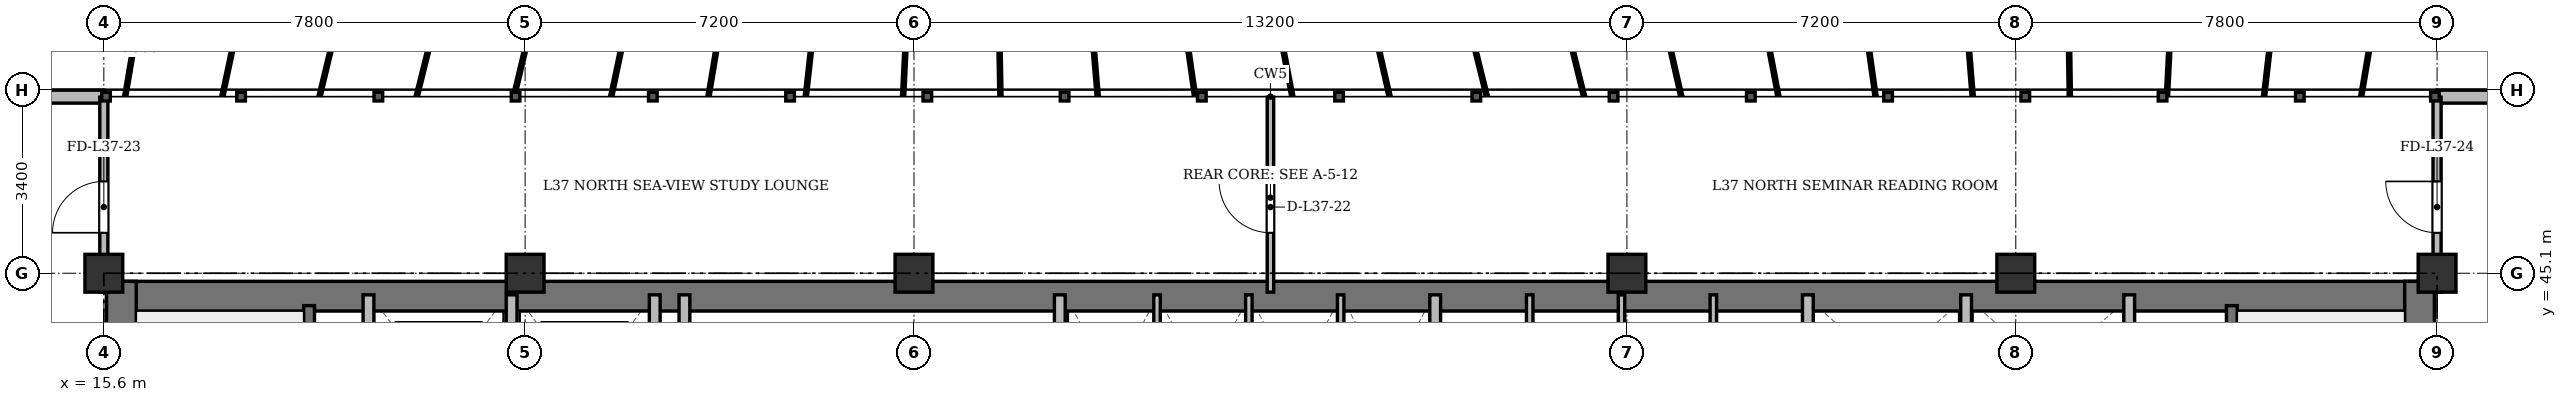
"""IFC4 building model, lengths in metres.
Left out: names, types, materials, properties, quantities, classifications, styles, units other than length and angle.
Written with IfcOpenShell. Run it as: python <this file> out.ifc"""

import sys

from ifc_helpers import new_model, si_unit, direction, frame, frame_2d, origin, origin_2d, place, context, subcontext, project, spatial, rectangle, extrude, source, transform, mapped, element, fill, save


model = new_model("IFC4")
c1 = context("Model", 3, precision=1e-05, world=origin(), true_north=direction((0.0, 1.0)))
c2 = subcontext(c1, "Body", "Model", "MODEL_VIEW")
j1 = project(units=[si_unit("LENGTHUNIT", "METRE"), si_unit("PLANEANGLEUNIT", "RADIAN")], contexts=[c1])
p1 = place(None, origin())
s1 = spatial("IfcSite", under=j1, at=p1, CompositionType="ELEMENT")
p2 = place(p1, origin())
s2 = spatial("IfcBuilding", under=s1, at=p2, CompositionType="ELEMENT")
p3 = place(p2, frame((0.0, 0.0, 142.9)))
s3 = spatial("IfcBuildingStorey", under=s2, at=p3, CompositionType="ELEMENT", Elevation=142.9)
m1 = source(origin(), c2, "Body", "SweptSolid", [
    extrude(rectangle(XDim=0.7, YDim=0.7, at=origin_2d()), origin(), (0.0, 0.0, 1.0), 3.6),
])
for number, where, z_axis, x_axis in (
    (1, (15.6, 45.1, 0.0), (0.0, 0.0, 1.0), (1.0, 0.0, 0.0)),
    (2, (23.4, 45.1, 0.0), (0.0, 0.0, 1.0), (1.0, 0.0, 0.0)),
    (3, (30.6, 45.1, 0.0), (0.0, 0.0, 1.0), (1.0, 0.0, 0.0)),
    (4, (43.8, 45.1, 0.0), (0.0, 0.0, 1.0), (1.0, 0.0, 0.0)),
    (5, (51.0, 45.1, 0.0), (0.0, 0.0, 1.0), (1.0, 0.0, 0.0)),
    (6, (58.8, 45.1, 0.0), (0.0, 0.0, 1.0), (1.0, 0.0, 0.0)),
):
    element("IfcColumn", number, at=place(p3, frame(where, z_axis=z_axis, x_axis=x_axis)), inside=s3, PredefinedType="COLUMN", context=c2, shape_type="MappedRepresentation", body=[
        mapped(m1, transform((0.0, 0.0, 0.0), x_axis=(1.0, 0.0, 0.0), y_axis=(0.0, 1.0, 0.0), z_axis=(0.0, 0.0, 1.0), scale=1.0)),
    ])
p4 = place(p3, frame((10.9, 48.37, 0.0), z_axis=(0.0, 0.0, 1.0), x_axis=(1.0, 0.0, 0.0)))
e7 = element("IfcWall", 7, at=p4, inside=s3, PredefinedType="SOLIDWALL", context=c2, shape_type="SweptSolid", body=[
    extrude(rectangle(XDim=4.7, YDim=0.24, at=frame_2d((2.35, 0.0))), origin(), (0.0, 0.0, 1.0), 3.35),
])
p5 = place(p4, frame((1.675, 0.0, 0.9)))
e8 = element("IfcOpeningElement", 8, at=p5, cuts=e7, PredefinedType="OPENING", context=c2, shape_type="SweptSolid", body=[
    extrude(rectangle(XDim=1.35, YDim=1.5, at=frame_2d((0.675, 0.75))), frame((0.0, 0.13, 0.0), z_axis=(0.0, -1.0, 0.0), x_axis=(1.0, 0.0, 0.0)), (0.0, 0.0, 1.0), 0.26),
])
p6 = place(p3, frame((58.8, 48.37, 0.0), z_axis=(0.0, 0.0, 1.0), x_axis=(1.0, 0.0, 0.0)))
e9 = element("IfcWall", 9, at=p6, inside=s3, PredefinedType="SOLIDWALL", context=c2, shape_type="SweptSolid", body=[
    extrude(rectangle(XDim=4.7, YDim=0.24, at=frame_2d((2.35, 0.0))), origin(), (0.0, 0.0, 1.0), 3.35),
])
p7 = place(p6, frame((1.675, 0.0, 0.9)))
e10 = element("IfcOpeningElement", 10, at=p7, cuts=e9, PredefinedType="OPENING", context=c2, shape_type="SweptSolid", body=[
    extrude(rectangle(XDim=1.35, YDim=1.5, at=frame_2d((0.675, 0.75))), frame((0.0, 0.13, 0.0), z_axis=(0.0, -1.0, 0.0), x_axis=(1.0, 0.0, 0.0)), (0.0, 0.0, 1.0), 0.26),
])
p8 = place(p3, frame((15.65, 44.675, 0.0), z_axis=(0.0, 0.0, 1.0), x_axis=(1.0, 0.0, 0.0)))
e11 = element("IfcWall", 11, at=p8, inside=s3, PredefinedType="SHEAR", context=c2, shape_type="SweptSolid", body=[
    extrude(rectangle(XDim=43.1, YDim=0.55, at=frame_2d((21.55, 0.0))), origin(), (0.0, 0.0, 1.0), 3.35),
])
for number, where, z_axis, x_axis in (
    (12, (15.925, 33.4, 0.0), (0.0, 0.0, 1.0), (0.0, 1.0, 0.0)),
    (13, (58.475, 33.4, 0.0), (0.0, 0.0, 1.0), (0.0, 1.0, 0.0)),
):
    element("IfcWall", number, at=place(p3, frame(where, z_axis=z_axis, x_axis=x_axis)), inside=s3, PredefinedType="SHEAR", context=c2, shape_type="SweptSolid", body=[
        extrude(rectangle(XDim=11.55, YDim=0.55, at=frame_2d((5.775, 0.0))), origin(), (0.0, 0.0, 1.0), 3.35),
    ])
p9 = place(p3, frame((19.4, 33.4, 0.0), z_axis=(0.0, 0.0, 1.0), x_axis=(0.0, 1.0, 0.0)))
e14 = element("IfcWall", 14, at=p9, inside=s3, PredefinedType="SHEAR", context=c2, shape_type="SweptSolid", body=[
    extrude(rectangle(XDim=11.1, YDim=0.2, at=frame_2d((5.55, 0.0))), origin(), (0.0, 0.0, 1.0), 3.35),
])
p10 = place(p9, frame((0.85, 0.0, 0.0)))
e15 = element("IfcOpeningElement", 15, at=p10, cuts=e14, PredefinedType="OPENING", context=c2, shape_type="SweptSolid", body=[
    extrude(rectangle(XDim=1.1, YDim=2.15, at=frame_2d((0.55, 1.075))), frame((0.0, 0.11, 0.0), z_axis=(0.0, -1.0, 0.0), x_axis=(1.0, 0.0, 0.0)), (0.0, 0.0, 1.0), 0.22),
])
p11 = place(p3, frame((55.0, 33.4, 0.0), z_axis=(0.0, 0.0, 1.0), x_axis=(0.0, 1.0, 0.0)))
e16 = element("IfcWall", 16, at=p11, inside=s3, PredefinedType="SHEAR", context=c2, shape_type="SweptSolid", body=[
    extrude(rectangle(XDim=11.1, YDim=0.2, at=frame_2d((5.55, 0.0))), origin(), (0.0, 0.0, 1.0), 3.35),
])
p12 = place(p11, frame((0.85, 0.0, 0.0)))
e17 = element("IfcOpeningElement", 17, at=p12, cuts=e16, PredefinedType="OPENING", context=c2, shape_type="SweptSolid", body=[
    extrude(rectangle(XDim=1.1, YDim=2.15, at=frame_2d((0.55, 1.075))), frame((0.0, 0.11, 0.0), z_axis=(0.0, -1.0, 0.0), x_axis=(1.0, 0.0, 0.0)), (0.0, 0.0, 1.0), 0.22),
])
for number, where, z_axis, x_axis in (
    (18, (20.5, 41.3, 0.0), (0.0, 0.0, 1.0), (0.0, 1.0, 0.0)),
    (19, (23.15, 41.3, 0.0), (0.0, 0.0, 1.0), (0.0, 1.0, 0.0)),
    (20, (25.8, 41.3, 0.0), (0.0, 0.0, 1.0), (0.0, 1.0, 0.0)),
):
    element("IfcWall", number, at=place(p3, frame(where, z_axis=z_axis, x_axis=x_axis)), inside=s3, PredefinedType="SOLIDWALL", context=c2, shape_type="SweptSolid", body=[
        extrude(rectangle(XDim=3.4, YDim=0.2, at=frame_2d((1.7, 0.0))), origin(), (0.0, 0.0, 1.0), 3.35),
    ])
for number, where, z_axis, x_axis in (
    (21, (26.35, 33.4, 0.0), (0.0, 0.0, 1.0), (0.0, 1.0, 0.0)),
    (22, (33.3, 33.4, 0.0), (0.0, 0.0, 1.0), (0.0, 1.0, 0.0)),
):
    element("IfcWall", number, at=place(p3, frame(where, z_axis=z_axis, x_axis=x_axis)), inside=s3, PredefinedType="SOLIDWALL", context=c2, shape_type="SweptSolid", body=[
        extrude(rectangle(XDim=11.3, YDim=0.2, at=frame_2d((5.65, 0.0))), origin(), (0.0, 0.0, 1.0), 2.75),
    ])
for number, where, z_axis, x_axis in (
    (23, (35.1, 41.5, 0.0), (0.0, 0.0, 1.0), (0.0, 1.0, 0.0)),
    (24, (36.8, 41.5, 0.0), (0.0, 0.0, 1.0), (0.0, 1.0, 0.0)),
    (25, (38.5, 41.5, 0.0), (0.0, 0.0, 1.0), (0.0, 1.0, 0.0)),
):
    element("IfcWall", number, at=place(p3, frame(where, z_axis=z_axis, x_axis=x_axis)), inside=s3, PredefinedType="PARTITIONING", context=c2, shape_type="SweptSolid", body=[
        extrude(rectangle(XDim=3.2, YDim=0.12, at=frame_2d((1.6, 0.0))), origin(), (0.0, 0.0, 1.0), 3.35),
    ])
p13 = place(p3, frame((40.25, 41.5, 0.0), z_axis=(0.0, 0.0, 1.0), x_axis=(0.0, 1.0, 0.0)))
e26 = element("IfcWall", 26, at=p13, inside=s3, PredefinedType="SOLIDWALL", context=c2, shape_type="SweptSolid", body=[
    extrude(rectangle(XDim=3.2, YDim=0.2, at=frame_2d((1.6, 0.0))), origin(), (0.0, 0.0, 1.0), 3.35),
])
p14 = place(p3, frame((42.0, 41.5, 0.0), z_axis=(0.0, 0.0, 1.0), x_axis=(0.0, 1.0, 0.0)))
e27 = element("IfcWall", 27, at=p14, inside=s3, PredefinedType="PARTITIONING", context=c2, shape_type="SweptSolid", body=[
    extrude(rectangle(XDim=3.2, YDim=0.12, at=frame_2d((1.6, 0.0))), origin(), (0.0, 0.0, 1.0), 3.35),
])
p15 = place(p3, frame((43.7, 41.5, 0.0), z_axis=(0.0, 0.0, 1.0), x_axis=(0.0, 1.0, 0.0)))
e28 = element("IfcWall", 28, at=p15, inside=s3, PredefinedType="PARTITIONING", context=c2, shape_type="SweptSolid", body=[
    extrude(rectangle(XDim=3.2, YDim=0.12, at=frame_2d((1.6, 0.0))), origin(), (0.0, 0.0, 1.0), 2.85),
])
p16 = place(p3, frame((45.4, 41.5, 0.0), z_axis=(0.0, 0.0, 1.0), x_axis=(0.0, 1.0, 0.0)))
e29 = element("IfcWall", 29, at=p16, inside=s3, PredefinedType="PARTITIONING", context=c2, shape_type="SweptSolid", body=[
    extrude(rectangle(XDim=3.2, YDim=0.12, at=frame_2d((1.6, 0.0))), origin(), (0.0, 0.0, 1.0), 3.35),
])
p17 = place(p3, frame((47.15, 33.4, 0.0), z_axis=(0.0, 0.0, 1.0), x_axis=(0.0, 1.0, 0.0)))
e30 = element("IfcWall", 30, at=p17, inside=s3, PredefinedType="SOLIDWALL", context=c2, shape_type="SweptSolid", body=[
    extrude(rectangle(XDim=11.3, YDim=0.2, at=frame_2d((5.65, 0.0))), origin(), (0.0, 0.0, 1.0), 2.75),
])
for number, where, z_axis, x_axis in (
    (31, (50.08, 42.05, 0.0), (0.0, 0.0, 1.0), (0.0, 1.0, 0.0)),
    (32, (53.1, 42.05, 0.0), (0.0, 0.0, 1.0), (0.0, 1.0, 0.0)),
):
    element("IfcWall", number, at=place(p3, frame(where, z_axis=z_axis, x_axis=x_axis)), inside=s3, PredefinedType="SOLIDWALL", context=c2, shape_type="SweptSolid", body=[
        extrude(rectangle(XDim=2.65, YDim=0.2, at=frame_2d((1.325, 0.0))), origin(), (0.0, 0.0, 1.0), 3.35),
    ])
p18 = place(p3, frame((37.2, 44.75, 0.0), z_axis=(0.0, 0.0, 1.0), x_axis=(0.0, 1.0, 0.0)))
e33 = element("IfcWall", 33, at=p18, inside=s3, PredefinedType="PARTITIONING", context=c2, shape_type="SweptSolid", body=[
    extrude(rectangle(XDim=3.61, YDim=0.12, at=frame_2d((1.805, 0.0))), origin(), (0.0, 0.0, 1.0), 2.75),
])
p19 = place(p18, frame((1.1, 0.0, 0.0)))
e34 = element("IfcOpeningElement", 34, at=p19, cuts=e33, PredefinedType="OPENING", context=c2, shape_type="SweptSolid", body=[
    extrude(rectangle(XDim=0.95, YDim=2.15, at=frame_2d((0.475, 1.075))), frame((0.0, 0.07, 0.0), z_axis=(0.0, -1.0, 0.0), x_axis=(1.0, 0.0, 0.0)), (0.0, 0.0, 1.0), 0.14),
])
p20 = place(p3, frame((15.6, 44.75, 0.0), z_axis=(0.0, 0.0, 1.0), x_axis=(0.0, 1.0, 0.0)))
e35 = element("IfcWall", 35, at=p20, inside=s3, PredefinedType="PARTITIONING", context=c2, shape_type="SweptSolid", body=[
    extrude(rectangle(XDim=3.61, YDim=0.15, at=frame_2d((1.805, 0.0))), origin(), (0.0, 0.0, 1.0), 2.85),
])
p21 = place(p20, frame((1.1, 0.0, 0.0)))
e36 = element("IfcOpeningElement", 36, at=p21, cuts=e35, PredefinedType="OPENING", context=c2, shape_type="SweptSolid", body=[
    extrude(rectangle(XDim=0.95, YDim=2.15, at=frame_2d((0.475, 1.075))), frame((0.0, 0.085, 0.0), z_axis=(0.0, -1.0, 0.0), x_axis=(1.0, 0.0, 0.0)), (0.0, 0.0, 1.0), 0.17),
])
p22 = place(p3, frame((58.8, 44.75, 0.0), z_axis=(0.0, 0.0, 1.0), x_axis=(0.0, 1.0, 0.0)))
e37 = element("IfcWall", 37, at=p22, inside=s3, PredefinedType="PARTITIONING", context=c2, shape_type="SweptSolid", body=[
    extrude(rectangle(XDim=3.61, YDim=0.15, at=frame_2d((1.805, 0.0))), origin(), (0.0, 0.0, 1.0), 2.85),
])
p23 = place(p22, frame((1.1, 0.0, 0.0)))
e38 = element("IfcOpeningElement", 38, at=p23, cuts=e37, PredefinedType="OPENING", context=c2, shape_type="SweptSolid", body=[
    extrude(rectangle(XDim=0.95, YDim=2.15, at=frame_2d((0.475, 1.075))), frame((0.0, 0.085, 0.0), z_axis=(0.0, -1.0, 0.0), x_axis=(1.0, 0.0, 0.0)), (0.0, 0.0, 1.0), 0.17),
])
m2 = source(origin(), c2, "Body", "SweptSolid", [
    extrude(rectangle(XDim=0.95, YDim=2.15, at=frame_2d((0.475, 1.075))), frame((0.0, 0.025, 0.0), z_axis=(0.0, -1.0, 0.0), x_axis=(1.0, 0.0, 0.0)), (0.0, 0.0, 1.0), 0.05),
])
p24 = place(p19, origin())
e39 = element("IfcDoor", 39, at=p24, inside=s3, OperationType="SINGLE_SWING_RIGHT", PredefinedType="DOOR", context=c2, shape_type="MappedRepresentation", body=[
    mapped(m2, transform((0.0, 0.0, 0.0), x_axis=(1.0, 0.0, 0.0), y_axis=(0.0, 1.0, 0.0), z_axis=(0.0, 0.0, 1.0), scale=1.0)),
])
fill(e34, e39)
p25 = place(p21, origin())
e40 = element("IfcDoor", 40, at=p25, inside=s3, OperationType="SINGLE_SWING_LEFT", PredefinedType="DOOR", context=c2, shape_type="MappedRepresentation", body=[
    mapped(m2, transform((0.0, 0.0, 0.0), x_axis=(1.0, 0.0, 0.0), y_axis=(0.0, 1.0, 0.0), z_axis=(0.0, 0.0, 1.0), scale=1.0)),
])
fill(e36, e40)
p26 = place(p23, origin())
e41 = element("IfcDoor", 41, at=p26, inside=s3, OperationType="SINGLE_SWING_RIGHT", PredefinedType="DOOR", context=c2, shape_type="MappedRepresentation", body=[
    mapped(m2, transform((0.0, 0.0, 0.0), x_axis=(1.0, 0.0, 0.0), y_axis=(0.0, 1.0, 0.0), z_axis=(0.0, 0.0, 1.0), scale=1.0)),
])
fill(e38, e41)
save(model, sys.argv[1])
